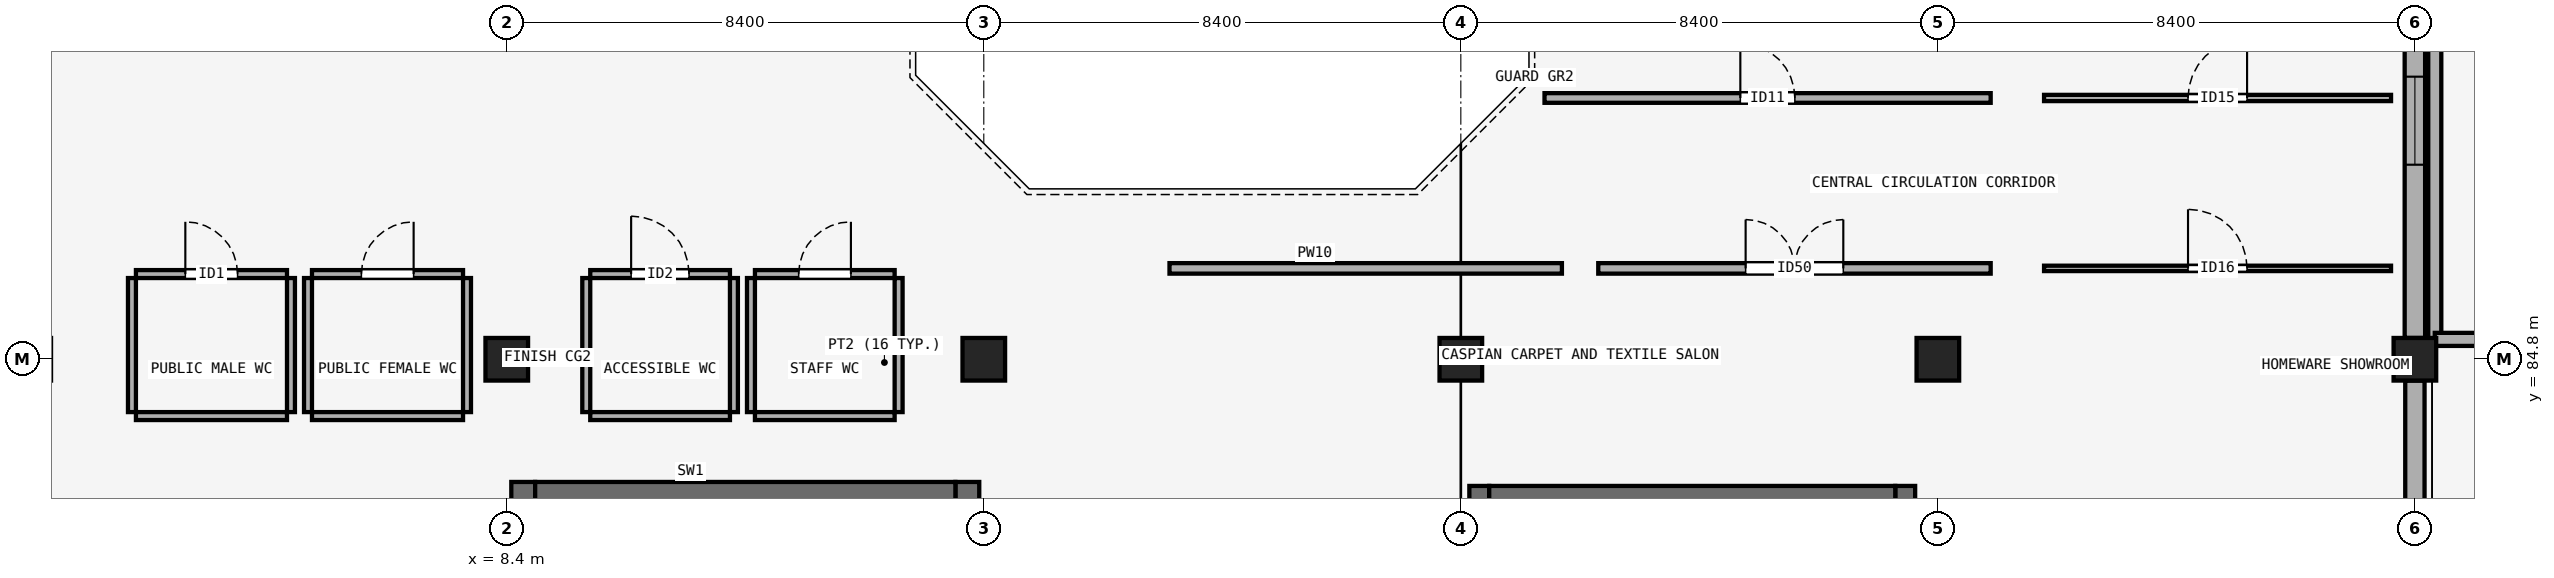
"""IFC4 building model, lengths in metres.
Left out: names, types, materials, properties, quantities, classifications, styles, units other than length and angle.
Written with IfcOpenShell. Run it as: python <this file> out.ifc"""

import sys

from ifc_helpers import new_model, si_unit, direction, frame, frame_2d, origin, origin_2d, place, context, subcontext, project, spatial, rectangle, extrude, element, fill, save


model = new_model("IFC4")
c1 = context("Model", 3, precision=1e-05, world=origin(), true_north=direction((0.0, 1.0)))
c2 = subcontext(c1, "Body", "Model", "MODEL_VIEW")
j1 = project(units=[si_unit("LENGTHUNIT", "METRE"), si_unit("PLANEANGLEUNIT", "RADIAN")], contexts=[c1])
p1 = place(None, origin())
s1 = spatial("IfcSite", under=j1, at=p1, CompositionType="ELEMENT")
p2 = place(p1, origin())
s2 = spatial("IfcBuilding", under=s1, at=p2, CompositionType="ELEMENT")
p3 = place(p2, frame((0.0, 0.0, 18.9)))
s3 = spatial("IfcBuildingStorey", under=s2, at=p3, CompositionType="ELEMENT", Elevation=18.9)
for number, where, z_axis, x_axis in (
    (1, (8.4, 84.8, 0.0), (0.0, 0.0, 1.0), (1.0, 0.0, 0.0)),
    (2, (16.8, 84.8, 0.0), (0.0, 0.0, 1.0), (1.0, 0.0, 0.0)),
    (3, (25.2, 84.8, 0.0), (0.0, 0.0, 1.0), (1.0, 0.0, 0.0)),
    (4, (33.6, 84.8, 0.0), (0.0, 0.0, 1.0), (1.0, 0.0, 0.0)),
    (5, (42.0, 84.8, 0.0), (0.0, 0.0, 1.0), (1.0, 0.0, 0.0)),
):
    element("IfcColumn", number, at=place(p3, frame(where, z_axis=z_axis, x_axis=x_axis)), inside=s3, PredefinedType="COLUMN", context=c2, shape_type="SweptSolid", body=[
        extrude(rectangle(XDim=0.75, YDim=0.75, at=origin_2d()), origin(), (0.0, 0.0, 1.0), 4.5),
    ])
p4 = place(p3, frame((42.0, 76.775, 0.0), z_axis=(0.0, 0.0, 1.0), x_axis=(0.0, 1.0, 0.0)))
e6 = element("IfcWall", 6, at=p4, inside=s3, PredefinedType="SOLIDWALL", context=c2, shape_type="SweptSolid", body=[
    extrude(rectangle(XDim=7.65, YDim=0.34, at=frame_2d((3.825, 0.0))), origin(), (0.0, 0.0, 1.0), 3.45),
])
p5 = place(p4, frame((3.2, 0.0, 0.0)))
e7 = element("IfcOpeningElement", 7, at=p5, cuts=e6, PredefinedType="OPENING", context=c2, shape_type="SweptSolid", body=[
    extrude(rectangle(XDim=1.25, YDim=2.2, at=frame_2d((0.625, 1.1))), frame((0.0, 0.18, 0.0), z_axis=(0.0, -1.0, 0.0), x_axis=(1.0, 0.0, 0.0)), (0.0, 0.0, 1.0), 0.36),
])
p6 = place(p3, frame((42.0, 85.175, 0.0), z_axis=(0.0, 0.0, 1.0), x_axis=(0.0, 1.0, 0.0)))
e8 = element("IfcWall", 8, at=p6, inside=s3, PredefinedType="SOLIDWALL", context=c2, shape_type="SweptSolid", body=[
    extrude(rectangle(XDim=7.65, YDim=0.36, at=frame_2d((3.825, 0.0))), origin(), (0.0, 0.0, 1.0), 3.45),
])
p7 = place(p6, frame((3.05, 0.0, 0.95)))
e9 = element("IfcOpeningElement", 9, at=p7, cuts=e8, PredefinedType="OPENING", context=c2, shape_type="SweptSolid", body=[
    extrude(rectangle(XDim=1.55, YDim=2.1, at=frame_2d((0.775, 1.05))), frame((0.0, 0.19, 0.0), z_axis=(0.0, -1.0, 0.0), x_axis=(1.0, 0.0, 0.0)), (0.0, 0.0, 1.0), 0.38),
])
p8 = place(p3, frame((42.35, 110.3, 0.0), z_axis=(0.0, 0.0, 1.0), x_axis=(0.0, -1.0, 0.0)))
e10 = element("IfcWall", 10, at=p8, inside=s3, PredefinedType="PARAPET", context=c2, shape_type="SweptSolid", body=[
    extrude(rectangle(XDim=25.15, YDim=0.23, at=frame_2d((12.575, 0.0))), origin(), (0.0, 0.0, 1.0), 0.95),
])
p9 = place(p3, frame((42.35, 85.15, 0.0), z_axis=(0.0, 0.0, 1.0), x_axis=(1.0, 0.0, 0.0)))
e11 = element("IfcWall", 11, at=p9, inside=s3, PredefinedType="PARAPET", context=c2, shape_type="SweptSolid", body=[
    extrude(rectangle(XDim=8.35, YDim=0.23, at=frame_2d((4.175, 0.0))), origin(), (0.0, 0.0, 1.0), 0.95),
])
p10 = place(p3, frame((8.69, 82.64, 0.0), z_axis=(0.0, 0.0, 1.0), x_axis=(0.0, -1.0, 0.0)))
e12 = element("IfcWall", 12, at=p10, inside=s3, PredefinedType="SHEAR", context=c2, shape_type="SweptSolid", body=[
    extrude(rectangle(XDim=4.08, YDim=0.42, at=frame_2d((2.04, 0.0))), origin(), (0.0, 0.0, 1.0), 4.2),
])
p11 = place(p10, frame((1.315, 0.0, 0.0)))
e13 = element("IfcOpeningElement", 13, at=p11, cuts=e12, PredefinedType="OPENING", context=c2, shape_type="SweptSolid", body=[
    extrude(rectangle(XDim=1.45, YDim=2.2, at=frame_2d((0.725, 1.1))), frame((0.0, 0.22, 0.0), z_axis=(0.0, -1.0, 0.0), x_axis=(1.0, 0.0, 0.0)), (0.0, 0.0, 1.0), 0.44),
])
p12 = place(p3, frame((16.51, 78.56, 0.0), z_axis=(0.0, 0.0, 1.0), x_axis=(0.0, 1.0, 0.0)))
e14 = element("IfcWall", 14, at=p12, inside=s3, PredefinedType="SHEAR", context=c2, shape_type="SweptSolid", body=[
    extrude(rectangle(XDim=4.08, YDim=0.42, at=frame_2d((2.04, 0.0))), origin(), (0.0, 0.0, 1.0), 4.2),
])
p13 = place(p3, frame((8.9, 82.43, 0.0), z_axis=(0.0, 0.0, 1.0), x_axis=(1.0, 0.0, 0.0)))
e15 = element("IfcWall", 15, at=p13, inside=s3, PredefinedType="SHEAR", context=c2, shape_type="SweptSolid", body=[
    extrude(rectangle(XDim=7.4, YDim=0.42, at=frame_2d((3.7, 0.0))), origin(), (0.0, 0.0, 1.0), 4.2),
])
p14 = place(p3, frame((25.525, 82.57, 0.0), z_axis=(0.0, 0.0, 1.0), x_axis=(0.0, -1.0, 0.0)))
e16 = element("IfcWall", 16, at=p14, inside=s3, PredefinedType="SHEAR", context=c2, shape_type="SweptSolid", body=[
    extrude(rectangle(XDim=3.94, YDim=0.35, at=frame_2d((1.97, 0.0))), origin(), (0.0, 0.0, 1.0), 4.2),
])
p15 = place(p14, frame((1.245, 0.0, 0.0)))
e17 = element("IfcOpeningElement", 17, at=p15, cuts=e16, PredefinedType="OPENING", context=c2, shape_type="SweptSolid", body=[
    extrude(rectangle(XDim=1.45, YDim=2.2, at=frame_2d((0.725, 1.1))), frame((0.0, 0.185, 0.0), z_axis=(0.0, -1.0, 0.0), x_axis=(1.0, 0.0, 0.0)), (0.0, 0.0, 1.0), 0.37),
])
p16 = place(p3, frame((33.025, 78.63, 0.0), z_axis=(0.0, 0.0, 1.0), x_axis=(0.0, 1.0, 0.0)))
e18 = element("IfcWall", 18, at=p16, inside=s3, PredefinedType="SHEAR", context=c2, shape_type="SweptSolid", body=[
    extrude(rectangle(XDim=3.94, YDim=0.35, at=frame_2d((1.97, 0.0))), origin(), (0.0, 0.0, 1.0), 4.2),
])
p17 = place(p3, frame((25.7, 82.395, 0.0), z_axis=(0.0, 0.0, 1.0), x_axis=(1.0, 0.0, 0.0)))
e19 = element("IfcWall", 19, at=p17, inside=s3, PredefinedType="SHEAR", context=c2, shape_type="SweptSolid", body=[
    extrude(rectangle(XDim=7.15, YDim=0.35, at=frame_2d((3.575, 0.0))), origin(), (0.0, 0.0, 1.0), 4.2),
])
p18 = place(p3, frame((1.87, 86.3, 0.0), z_axis=(0.0, 0.0, 1.0), x_axis=(1.0, 0.0, 0.0)))
e20 = element("IfcWall", 20, at=p18, inside=s3, PredefinedType="PARTITIONING", context=c2, shape_type="SweptSolid", body=[
    extrude(rectangle(XDim=2.66, YDim=0.14, at=frame_2d((1.33, 0.0))), origin(), (0.0, 0.0, 1.0), 4.2),
])
p19 = place(p18, frame((0.87, 0.0, 0.0)))
e21 = element("IfcOpeningElement", 21, at=p19, cuts=e20, PredefinedType="OPENING", context=c2, shape_type="SweptSolid", body=[
    extrude(rectangle(XDim=0.92, YDim=2.12, at=frame_2d((0.46, 1.06))), frame((0.0, 0.08, 0.0), z_axis=(0.0, -1.0, 0.0), x_axis=(1.0, 0.0, 0.0)), (0.0, 0.0, 1.0), 0.16),
])
p20 = place(p3, frame((1.87, 83.8, 0.0), z_axis=(0.0, 0.0, 1.0), x_axis=(1.0, 0.0, 0.0)))
e22 = element("IfcWall", 22, at=p20, inside=s3, PredefinedType="PARTITIONING", context=c2, shape_type="SweptSolid", body=[
    extrude(rectangle(XDim=2.66, YDim=0.14, at=frame_2d((1.33, 0.0))), origin(), (0.0, 0.0, 1.0), 4.2),
])
for number, where, z_axis, x_axis in (
    (23, (1.8, 83.87, 0.0), (0.0, 0.0, 1.0), (0.0, 1.0, 0.0)),
    (24, (4.6, 83.87, 0.0), (0.0, 0.0, 1.0), (0.0, 1.0, 0.0)),
):
    element("IfcWall", number, at=place(p3, frame(where, z_axis=z_axis, x_axis=x_axis)), inside=s3, PredefinedType="PARTITIONING", context=c2, shape_type="SweptSolid", body=[
        extrude(rectangle(XDim=2.36, YDim=0.14, at=frame_2d((1.18, 0.0))), origin(), (0.0, 0.0, 1.0), 3.45),
    ])
p21 = place(p3, frame((4.97, 86.3, 0.0), z_axis=(0.0, 0.0, 1.0), x_axis=(1.0, 0.0, 0.0)))
e25 = element("IfcWall", 25, at=p21, inside=s3, PredefinedType="PARTITIONING", context=c2, shape_type="SweptSolid", body=[
    extrude(rectangle(XDim=2.66, YDim=0.14, at=frame_2d((1.33, 0.0))), origin(), (0.0, 0.0, 1.0), 4.2),
])
p22 = place(p21, frame((0.87, 0.0, 0.0)))
e26 = element("IfcOpeningElement", 26, at=p22, cuts=e25, PredefinedType="OPENING", context=c2, shape_type="SweptSolid", body=[
    extrude(rectangle(XDim=0.92, YDim=2.12, at=frame_2d((0.46, 1.06))), frame((0.0, 0.08, 0.0), z_axis=(0.0, -1.0, 0.0), x_axis=(1.0, 0.0, 0.0)), (0.0, 0.0, 1.0), 0.16),
])
p23 = place(p3, frame((4.97, 83.8, 0.0), z_axis=(0.0, 0.0, 1.0), x_axis=(1.0, 0.0, 0.0)))
e27 = element("IfcWall", 27, at=p23, inside=s3, PredefinedType="PARTITIONING", context=c2, shape_type="SweptSolid", body=[
    extrude(rectangle(XDim=2.66, YDim=0.14, at=frame_2d((1.33, 0.0))), origin(), (0.0, 0.0, 1.0), 4.2),
])
for number, where, z_axis, x_axis in (
    (28, (4.9, 83.87, 0.0), (0.0, 0.0, 1.0), (0.0, 1.0, 0.0)),
    (29, (7.7, 83.87, 0.0), (0.0, 0.0, 1.0), (0.0, 1.0, 0.0)),
):
    element("IfcWall", number, at=place(p3, frame(where, z_axis=z_axis, x_axis=x_axis)), inside=s3, PredefinedType="PARTITIONING", context=c2, shape_type="SweptSolid", body=[
        extrude(rectangle(XDim=2.36, YDim=0.14, at=frame_2d((1.18, 0.0))), origin(), (0.0, 0.0, 1.0), 3.45),
    ])
p24 = place(p3, frame((9.87, 86.3, 0.0), z_axis=(0.0, 0.0, 1.0), x_axis=(1.0, 0.0, 0.0)))
e30 = element("IfcWall", 30, at=p24, inside=s3, PredefinedType="PARTITIONING", context=c2, shape_type="SweptSolid", body=[
    extrude(rectangle(XDim=2.46, YDim=0.14, at=frame_2d((1.23, 0.0))), origin(), (0.0, 0.0, 1.0), 4.2),
])
p25 = place(p24, frame((0.72, 0.0, 0.0)))
e31 = element("IfcOpeningElement", 31, at=p25, cuts=e30, PredefinedType="OPENING", context=c2, shape_type="SweptSolid", body=[
    extrude(rectangle(XDim=1.02, YDim=2.15, at=frame_2d((0.51, 1.075))), frame((0.0, 0.08, 0.0), z_axis=(0.0, -1.0, 0.0), x_axis=(1.0, 0.0, 0.0)), (0.0, 0.0, 1.0), 0.16),
])
p26 = place(p3, frame((9.87, 83.8, 0.0), z_axis=(0.0, 0.0, 1.0), x_axis=(1.0, 0.0, 0.0)))
e32 = element("IfcWall", 32, at=p26, inside=s3, PredefinedType="PARTITIONING", context=c2, shape_type="SweptSolid", body=[
    extrude(rectangle(XDim=2.46, YDim=0.14, at=frame_2d((1.23, 0.0))), origin(), (0.0, 0.0, 1.0), 4.2),
])
for number, where, z_axis, x_axis in (
    (33, (9.8, 83.87, 0.0), (0.0, 0.0, 1.0), (0.0, 1.0, 0.0)),
    (34, (12.4, 83.87, 0.0), (0.0, 0.0, 1.0), (0.0, 1.0, 0.0)),
):
    element("IfcWall", number, at=place(p3, frame(where, z_axis=z_axis, x_axis=x_axis)), inside=s3, PredefinedType="PARTITIONING", context=c2, shape_type="SweptSolid", body=[
        extrude(rectangle(XDim=2.36, YDim=0.14, at=frame_2d((1.18, 0.0))), origin(), (0.0, 0.0, 1.0), 3.45),
    ])
p27 = place(p3, frame((12.77, 86.3, 0.0), z_axis=(0.0, 0.0, 1.0), x_axis=(1.0, 0.0, 0.0)))
e35 = element("IfcWall", 35, at=p27, inside=s3, PredefinedType="PARTITIONING", context=c2, shape_type="SweptSolid", body=[
    extrude(rectangle(XDim=2.46, YDim=0.14, at=frame_2d((1.23, 0.0))), origin(), (0.0, 0.0, 1.0), 4.2),
])
p28 = place(p27, frame((0.77, 0.0, 0.0)))
e36 = element("IfcOpeningElement", 36, at=p28, cuts=e35, PredefinedType="OPENING", context=c2, shape_type="SweptSolid", body=[
    extrude(rectangle(XDim=0.92, YDim=2.12, at=frame_2d((0.46, 1.06))), frame((0.0, 0.08, 0.0), z_axis=(0.0, -1.0, 0.0), x_axis=(1.0, 0.0, 0.0)), (0.0, 0.0, 1.0), 0.16),
])
p29 = place(p3, frame((12.77, 83.8, 0.0), z_axis=(0.0, 0.0, 1.0), x_axis=(1.0, 0.0, 0.0)))
e37 = element("IfcWall", 37, at=p29, inside=s3, PredefinedType="PARTITIONING", context=c2, shape_type="SweptSolid", body=[
    extrude(rectangle(XDim=2.46, YDim=0.14, at=frame_2d((1.23, 0.0))), origin(), (0.0, 0.0, 1.0), 4.2),
])
for number, where, z_axis, x_axis in (
    (38, (12.7, 83.87, 0.0), (0.0, 0.0, 1.0), (0.0, 1.0, 0.0)),
    (39, (15.3, 83.87, 0.0), (0.0, 0.0, 1.0), (0.0, 1.0, 0.0)),
):
    element("IfcWall", number, at=place(p3, frame(where, z_axis=z_axis, x_axis=x_axis)), inside=s3, PredefinedType="PARTITIONING", context=c2, shape_type="SweptSolid", body=[
        extrude(rectangle(XDim=2.36, YDim=0.14, at=frame_2d((1.18, 0.0))), origin(), (0.0, 0.0, 1.0), 3.45),
    ])
p30 = place(p3, frame((20.07, 86.4, 0.0), z_axis=(0.0, 0.0, 1.0), x_axis=(1.0, 0.0, 0.0)))
e40 = element("IfcWall", 40, at=p30, inside=s3, PredefinedType="PARTITIONING", context=c2, shape_type="SweptSolid", body=[
    extrude(rectangle(XDim=6.91, YDim=0.185, at=frame_2d((3.455, 0.0))), origin(), (0.0, 0.0, 1.0), 4.2),
])
p31 = place(p3, frame((27.62, 86.4, 0.0), z_axis=(0.0, 0.0, 1.0), x_axis=(1.0, 0.0, 0.0)))
e41 = element("IfcWall", 41, at=p31, inside=s3, PredefinedType="PARTITIONING", context=c2, shape_type="SweptSolid", body=[
    extrude(rectangle(XDim=6.91, YDim=0.185, at=frame_2d((3.455, 0.0))), origin(), (0.0, 0.0, 1.0), 3.45),
])
p32 = place(p31, frame((2.595, 0.0, 0.0)))
e42 = element("IfcOpeningElement", 42, at=p32, cuts=e41, PredefinedType="OPENING", context=c2, shape_type="SweptSolid", body=[
    extrude(rectangle(XDim=1.72, YDim=2.46, at=frame_2d((0.86, 1.23))), frame((0.0, 0.103, 0.0), z_axis=(0.0, -1.0, 0.0), x_axis=(1.0, 0.0, 0.0)), (0.0, 0.0, 1.0), 0.205),
])
p33 = place(p3, frame((26.674, 89.4, 0.0), z_axis=(0.0, 0.0, 1.0), x_axis=(1.0, 0.0, 0.0)))
e43 = element("IfcWall", 43, at=p33, inside=s3, PredefinedType="PARTITIONING", context=c2, shape_type="SweptSolid", body=[
    extrude(rectangle(XDim=7.856, YDim=0.17, at=frame_2d((3.928, 0.0))), origin(), (0.0, 0.0, 1.0), 3.45),
])
p34 = place(p33, frame((3.448, 0.0, 0.0)))
e44 = element("IfcOpeningElement", 44, at=p34, cuts=e43, PredefinedType="OPENING", context=c2, shape_type="SweptSolid", body=[
    extrude(rectangle(XDim=0.96, YDim=2.1, at=frame_2d((0.48, 1.05))), frame((0.0, 0.095, 0.0), z_axis=(0.0, -1.0, 0.0), x_axis=(1.0, 0.0, 0.0)), (0.0, 0.0, 1.0), 0.19),
])
p35 = place(p3, frame((35.47, 89.4, 0.0), z_axis=(0.0, 0.0, 1.0), x_axis=(1.0, 0.0, 0.0)))
e45 = element("IfcWall", 45, at=p35, inside=s3, PredefinedType="PARTITIONING", context=c2, shape_type="SweptSolid", body=[
    extrude(rectangle(XDim=6.11, YDim=0.11, at=frame_2d((3.055, 0.0))), origin(), (0.0, 0.0, 1.0), 4.2),
])
p36 = place(p35, frame((2.535, 0.0, 0.0)))
e46 = element("IfcOpeningElement", 46, at=p36, cuts=e45, PredefinedType="OPENING", context=c2, shape_type="SweptSolid", body=[
    extrude(rectangle(XDim=1.04, YDim=2.1, at=frame_2d((0.52, 1.05))), frame((0.0, 0.065, 0.0), z_axis=(0.0, -1.0, 0.0), x_axis=(1.0, 0.0, 0.0)), (0.0, 0.0, 1.0), 0.13),
])
p37 = place(p3, frame((35.47, 86.4, 0.0), z_axis=(0.0, 0.0, 1.0), x_axis=(1.0, 0.0, 0.0)))
e47 = element("IfcWall", 47, at=p37, inside=s3, PredefinedType="PARTITIONING", context=c2, shape_type="SweptSolid", body=[
    extrude(rectangle(XDim=6.11, YDim=0.095, at=frame_2d((3.055, 0.0))), origin(), (0.0, 0.0, 1.0), 4.2),
])
p38 = place(p37, frame((2.535, 0.0, 0.0)))
e48 = element("IfcOpeningElement", 48, at=p38, cuts=e47, PredefinedType="OPENING", context=c2, shape_type="SweptSolid", body=[
    extrude(rectangle(XDim=1.04, YDim=2.22, at=frame_2d((0.52, 1.11))), frame((0.0, 0.057, 0.0), z_axis=(0.0, -1.0, 0.0), x_axis=(1.0, 0.0, 0.0)), (0.0, 0.0, 1.0), 0.115),
])
p39 = place(p7, origin())
e49 = element("IfcWindow", 49, at=p39, inside=s3, PartitioningType="SINGLE_PANEL", PredefinedType="WINDOW", context=c2, shape_type="SweptSolid", body=[
    extrude(rectangle(XDim=1.55, YDim=2.1, at=frame_2d((0.775, 1.05))), frame((0.0, 0.03, 0.0), z_axis=(0.0, -1.0, 0.0), x_axis=(1.0, 0.0, 0.0)), (0.0, 0.0, 1.0), 0.06),
])
fill(e9, e49)
p40 = place(p19, origin())
e50 = element("IfcDoor", 50, at=p40, inside=s3, OperationType="SINGLE_SWING_LEFT", PredefinedType="DOOR", context=c2, shape_type="SweptSolid", body=[
    extrude(rectangle(XDim=0.92, YDim=2.12, at=frame_2d((0.46, 1.06))), frame((0.0, 0.025, 0.0), z_axis=(0.0, -1.0, 0.0), x_axis=(1.0, 0.0, 0.0)), (0.0, 0.0, 1.0), 0.05),
])
fill(e21, e50)
p41 = place(p22, origin())
e51 = element("IfcDoor", 51, at=p41, inside=s3, OperationType="SINGLE_SWING_RIGHT", PredefinedType="DOOR", context=c2, shape_type="SweptSolid", body=[
    extrude(rectangle(XDim=0.92, YDim=2.12, at=frame_2d((0.46, 1.06))), frame((0.0, 0.025, 0.0), z_axis=(0.0, -1.0, 0.0), x_axis=(1.0, 0.0, 0.0)), (0.0, 0.0, 1.0), 0.05),
])
fill(e26, e51)
p42 = place(p25, origin())
e52 = element("IfcDoor", 52, at=p42, inside=s3, OperationType="SINGLE_SWING_LEFT", PredefinedType="DOOR", context=c2, shape_type="SweptSolid", body=[
    extrude(rectangle(XDim=1.02, YDim=2.15, at=frame_2d((0.51, 1.075))), frame((0.0, 0.025, 0.0), z_axis=(0.0, -1.0, 0.0), x_axis=(1.0, 0.0, 0.0)), (0.0, 0.0, 1.0), 0.05),
])
fill(e31, e52)
p43 = place(p28, origin())
e53 = element("IfcDoor", 53, at=p43, inside=s3, OperationType="SINGLE_SWING_RIGHT", PredefinedType="DOOR", context=c2, shape_type="SweptSolid", body=[
    extrude(rectangle(XDim=0.92, YDim=2.12, at=frame_2d((0.46, 1.06))), frame((0.0, 0.025, 0.0), z_axis=(0.0, -1.0, 0.0), x_axis=(1.0, 0.0, 0.0)), (0.0, 0.0, 1.0), 0.05),
])
fill(e36, e53)
p44 = place(p32, origin())
e54 = element("IfcDoor", 54, at=p44, inside=s3, OperationType="DOUBLE_DOOR_SINGLE_SWING", PredefinedType="DOOR", context=c2, shape_type="SweptSolid", body=[
    extrude(rectangle(XDim=1.72, YDim=2.46, at=frame_2d((0.86, 1.23))), frame((0.0, 0.025, 0.0), z_axis=(0.0, -1.0, 0.0), x_axis=(1.0, 0.0, 0.0)), (0.0, 0.0, 1.0), 0.05),
])
fill(e42, e54)
p45 = place(p34, origin())
e55 = element("IfcDoor", 55, at=p45, inside=s3, OperationType="SINGLE_SWING_LEFT", PredefinedType="DOOR", context=c2, shape_type="SweptSolid", body=[
    extrude(rectangle(XDim=0.96, YDim=2.1, at=frame_2d((0.48, 1.05))), frame((0.0, 0.025, 0.0), z_axis=(0.0, -1.0, 0.0), x_axis=(1.0, 0.0, 0.0)), (0.0, 0.0, 1.0), 0.05),
])
fill(e44, e55)
p46 = place(p36, origin())
e56 = element("IfcDoor", 56, at=p46, inside=s3, OperationType="SINGLE_SWING_RIGHT", PredefinedType="DOOR", context=c2, shape_type="SweptSolid", body=[
    extrude(rectangle(XDim=1.04, YDim=2.1, at=frame_2d((0.52, 1.05))), frame((0.0, 0.025, 0.0), z_axis=(0.0, -1.0, 0.0), x_axis=(1.0, 0.0, 0.0)), (0.0, 0.0, 1.0), 0.05),
])
fill(e46, e56)
p47 = place(p38, origin())
e57 = element("IfcDoor", 57, at=p47, inside=s3, OperationType="SINGLE_SWING_LEFT", PredefinedType="DOOR", context=c2, shape_type="SweptSolid", body=[
    extrude(rectangle(XDim=1.04, YDim=2.22, at=frame_2d((0.52, 1.11))), frame((0.0, 0.025, 0.0), z_axis=(0.0, -1.0, 0.0), x_axis=(1.0, 0.0, 0.0)), (0.0, 0.0, 1.0), 0.05),
])
fill(e48, e57)
save(model, sys.argv[1])
